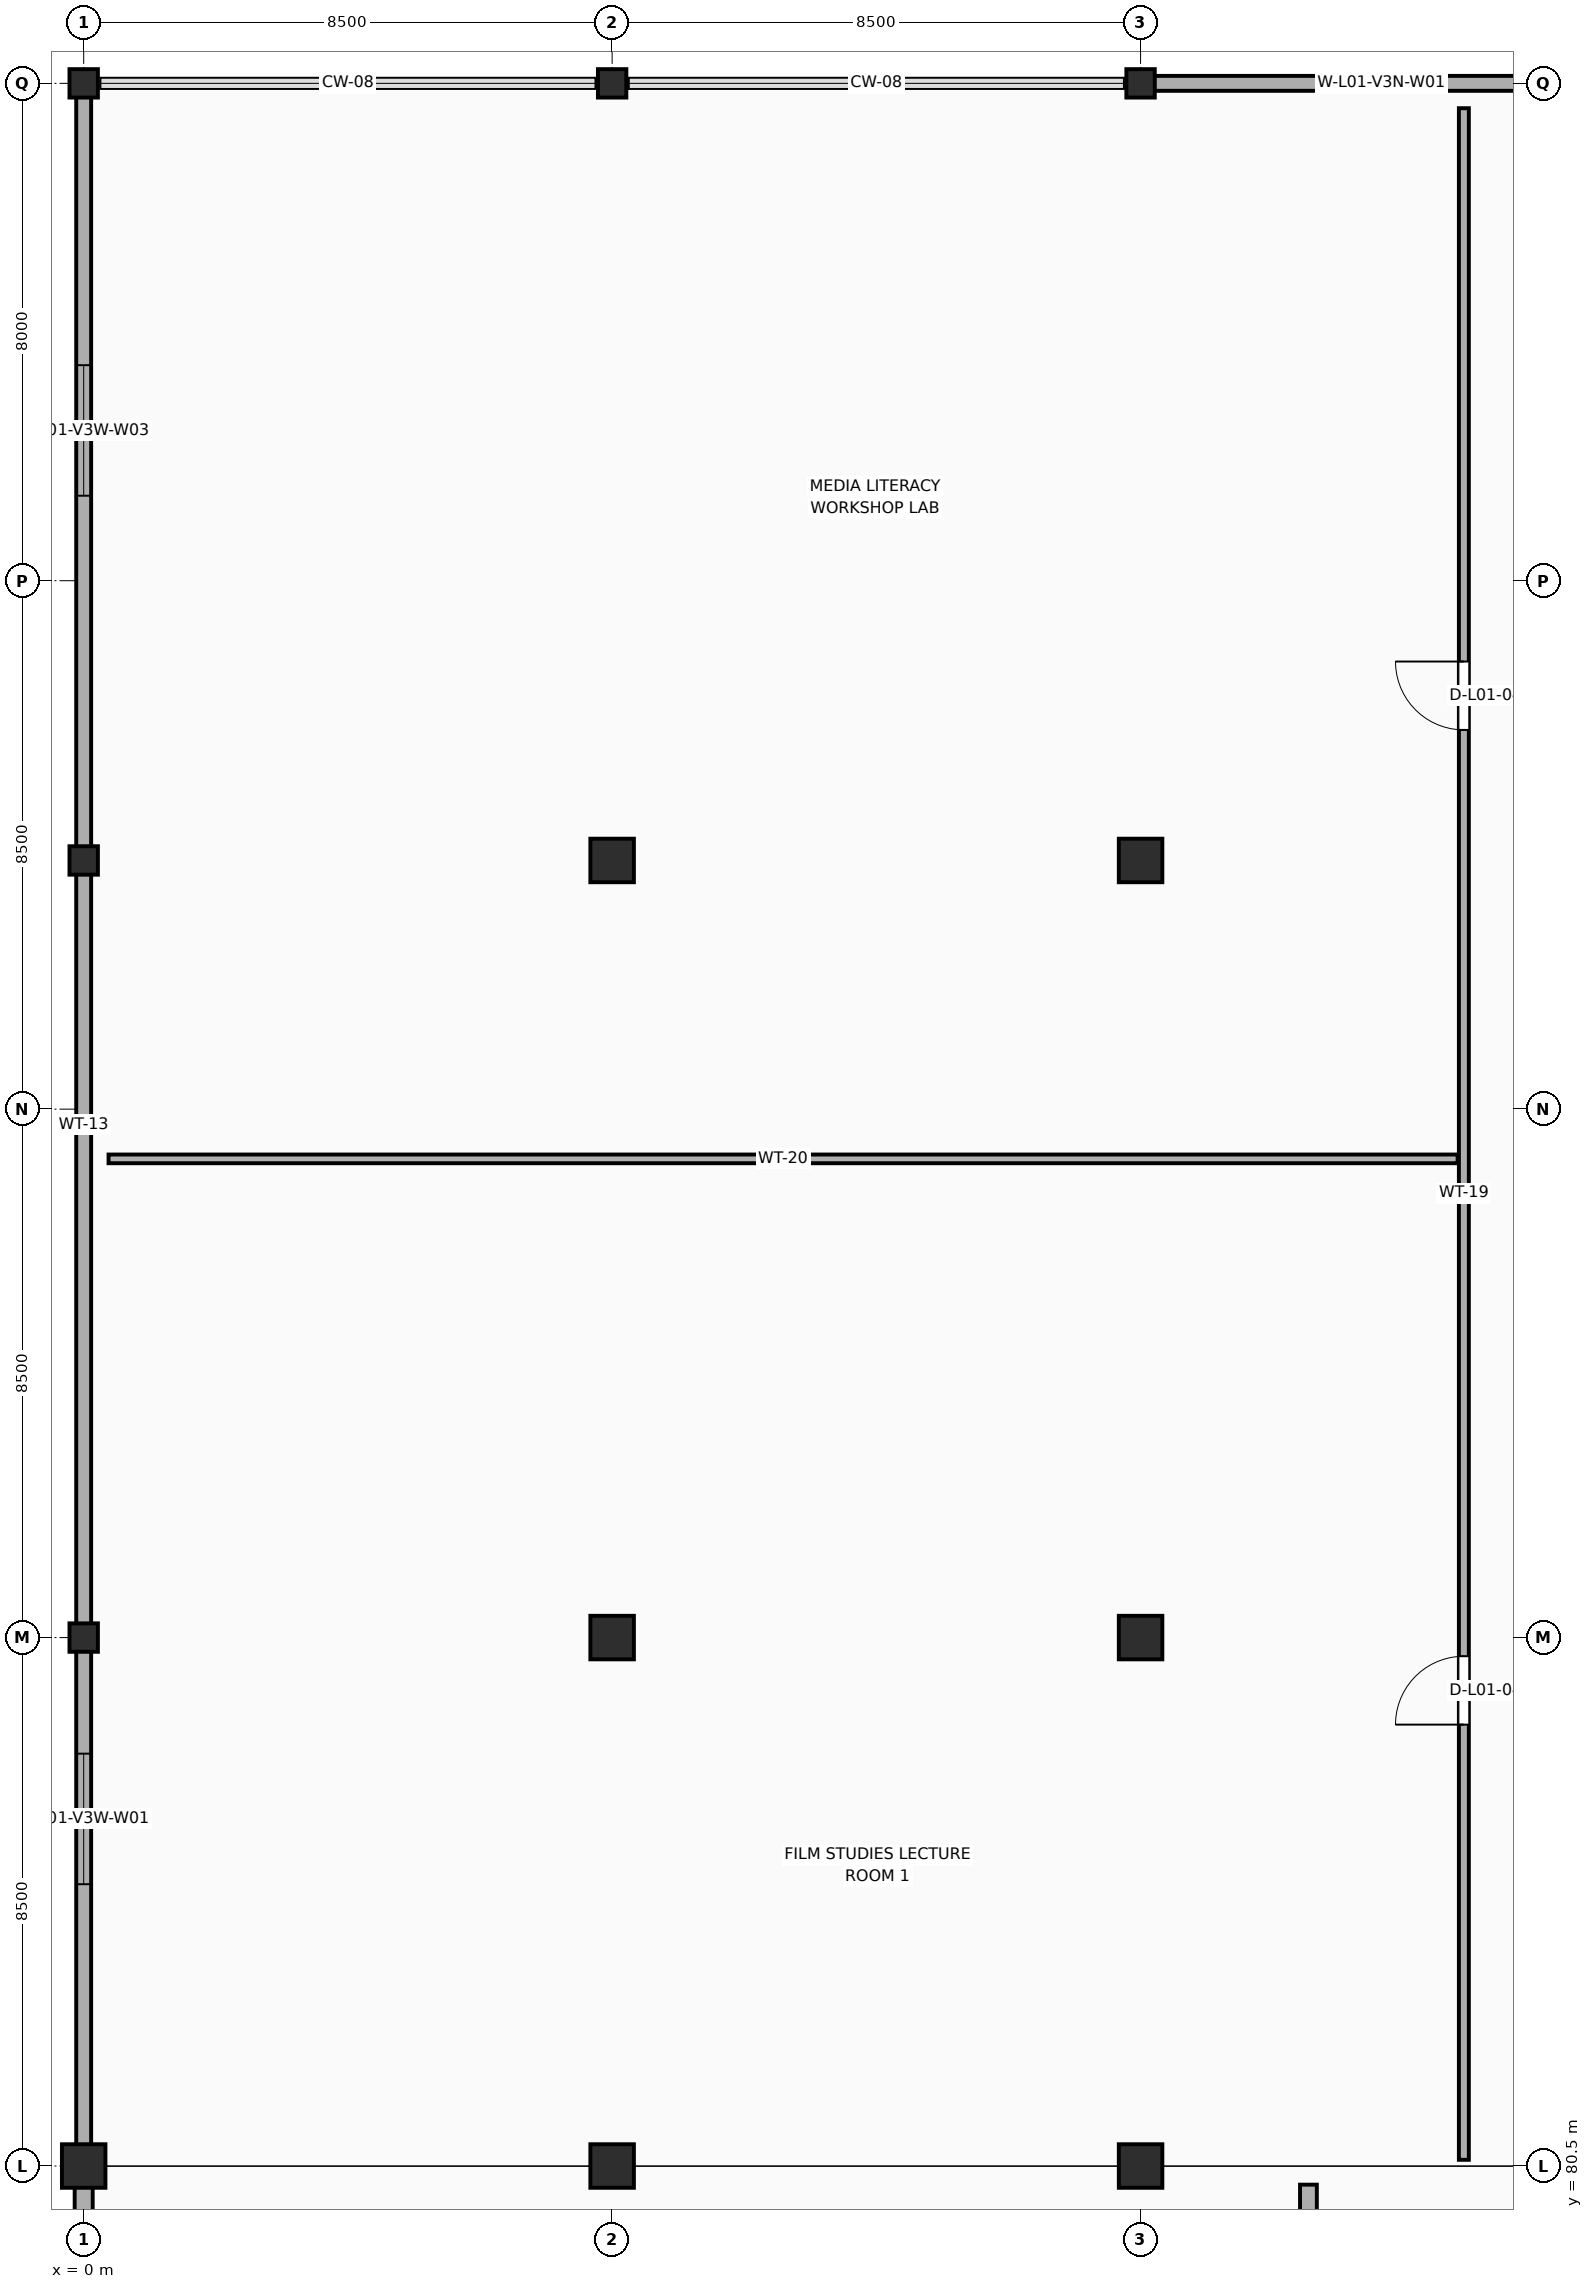
"""IFC4 building model, lengths in metres.
Left out: names, types, materials, properties, quantities, classifications, styles, units other than length and angle.
Written with IfcOpenShell. Run it as: python <this file> out.ifc"""

import sys

from ifc_helpers import new_model, si_unit, direction, frame, frame_2d, origin, origin_2d, place, context, subcontext, project, spatial, rectangle, hollow_circle, extrude, element, fill, save


model = new_model("IFC4")
c1 = context("Model", 3, precision=1e-05, world=origin(), true_north=direction((0.0, 1.0)))
c2 = subcontext(c1, "Body", "Model", "MODEL_VIEW")
j1 = project(units=[si_unit("LENGTHUNIT", "METRE"), si_unit("PLANEANGLEUNIT", "RADIAN")], contexts=[c1])
p1 = place(None, origin())
s1 = spatial("IfcSite", under=j1, at=p1, CompositionType="ELEMENT")
p2 = place(p1, origin())
s2 = spatial("IfcBuilding", under=s1, at=p2, CompositionType="ELEMENT")
p3 = place(p2, frame((0.0, 0.0, 5.4)))
s3 = spatial("IfcBuildingStorey", under=s2, at=p3, CompositionType="ELEMENT", Elevation=5.4)
p4 = place(p3, frame((0.0, 80.5, 0.0), z_axis=(0.0, 0.0, 1.0), x_axis=(1.0, 0.0, 0.0)))
e1 = element("IfcColumn", 1, at=p4, inside=s3, PredefinedType="COLUMN", context=c2, shape_type="SweptSolid", body=[
    extrude(rectangle(XDim=0.7, YDim=0.7, at=origin_2d()), origin(), (0.0, 0.0, 1.0), 4.53),
])
p5 = place(p3, frame((0.0, 89.0, 0.0), z_axis=(0.0, 0.0, 1.0), x_axis=(1.0, 0.0, 0.0)))
e2 = element("IfcColumn", 2, at=p5, inside=s3, PredefinedType="COLUMN", context=c2, shape_type="SweptSolid", body=[
    extrude(hollow_circle(Radius=0.229, WallThickness=0.016, at=origin_2d()), origin(), (0.0, 0.0, 1.0), 4.53),
])
for number, where, z_axis, x_axis in (
    (3, (0.0, 101.5, 0.0), (0.0, 0.0, 1.0), (1.0, 0.0, 0.0)),
    (4, (0.0, 114.0, 0.0), (0.0, 0.0, 1.0), (1.0, 0.0, 0.0)),
):
    element("IfcColumn", number, at=place(p3, frame(where, z_axis=z_axis, x_axis=x_axis)), inside=s3, PredefinedType="COLUMN", context=c2, shape_type="SweptSolid", body=[
        extrude(hollow_circle(Radius=0.229, WallThickness=0.016, at=origin_2d()), origin(), (0.0, 0.0, 1.0), 4.54),
    ])
for number, where, z_axis, x_axis in (
    (5, (8.5, 80.5, 0.0), (0.0, 0.0, 1.0), (1.0, 0.0, 0.0)),
    (6, (8.5, 89.0, 0.0), (0.0, 0.0, 1.0), (1.0, 0.0, 0.0)),
):
    element("IfcColumn", number, at=place(p3, frame(where, z_axis=z_axis, x_axis=x_axis)), inside=s3, PredefinedType="COLUMN", context=c2, shape_type="SweptSolid", body=[
        extrude(rectangle(XDim=0.7, YDim=0.7, at=origin_2d()), origin(), (0.0, 0.0, 1.0), 4.53),
    ])
p6 = place(p3, frame((8.5, 101.5, 0.0), z_axis=(0.0, 0.0, 1.0), x_axis=(1.0, 0.0, 0.0)))
e7 = element("IfcColumn", 7, at=p6, inside=s3, PredefinedType="COLUMN", context=c2, shape_type="SweptSolid", body=[
    extrude(rectangle(XDim=0.7, YDim=0.7, at=origin_2d()), origin(), (0.0, 0.0, 1.0), 4.54),
])
p7 = place(p3, frame((8.5, 114.0, 0.0), z_axis=(0.0, 0.0, 1.0), x_axis=(1.0, 0.0, 0.0)))
e8 = element("IfcColumn", 8, at=p7, inside=s3, PredefinedType="COLUMN", context=c2, shape_type="SweptSolid", body=[
    extrude(hollow_circle(Radius=0.229, WallThickness=0.016, at=origin_2d()), origin(), (0.0, 0.0, 1.0), 4.54),
])
for number, where, z_axis, x_axis in (
    (9, (17.0, 80.5, 0.0), (0.0, 0.0, 1.0), (1.0, 0.0, 0.0)),
    (10, (17.0, 89.0, 0.0), (0.0, 0.0, 1.0), (1.0, 0.0, 0.0)),
):
    element("IfcColumn", number, at=place(p3, frame(where, z_axis=z_axis, x_axis=x_axis)), inside=s3, PredefinedType="COLUMN", context=c2, shape_type="SweptSolid", body=[
        extrude(rectangle(XDim=0.7, YDim=0.7, at=origin_2d()), origin(), (0.0, 0.0, 1.0), 4.53),
    ])
p8 = place(p3, frame((17.0, 101.5, 0.0), z_axis=(0.0, 0.0, 1.0), x_axis=(1.0, 0.0, 0.0)))
e11 = element("IfcColumn", 11, at=p8, inside=s3, PredefinedType="COLUMN", context=c2, shape_type="SweptSolid", body=[
    extrude(rectangle(XDim=0.7, YDim=0.7, at=origin_2d()), origin(), (0.0, 0.0, 1.0), 4.54),
])
p9 = place(p3, frame((17.0, 114.0, 0.0), z_axis=(0.0, 0.0, 1.0), x_axis=(1.0, 0.0, 0.0)))
e12 = element("IfcColumn", 12, at=p9, inside=s3, PredefinedType="COLUMN", context=c2, shape_type="SweptSolid", body=[
    extrude(hollow_circle(Radius=0.229, WallThickness=0.016, at=origin_2d()), origin(), (0.0, 0.0, 1.0), 4.54),
])
p10 = place(p3, frame((0.0, 32.0, 0.0), z_axis=(0.0, 0.0, 1.0), x_axis=(0.0, 1.0, 0.0)))
e13 = element("IfcWall", 13, at=p10, inside=s3, PredefinedType="STANDARD", context=c2, shape_type="SweptSolid", body=[
    extrude(rectangle(XDim=48.5, YDim=0.29, at=frame_2d((24.25, 0.0))), origin(), (0.0, 0.0, 1.0), 3.68),
])
p11 = place(p10, frame((3.35, 0.0, 2.12)))
e14 = element("IfcOpeningElement", 14, at=p11, cuts=e13, PredefinedType="OPENING", context=c2, shape_type="SweptSolid", body=[
    extrude(rectangle(XDim=3.0, YDim=1.4, at=frame_2d((1.5, 0.7))), frame((0.0, 0.157, 0.0), z_axis=(0.0, -1.0, 0.0), x_axis=(1.0, 0.0, 0.0)), (0.0, 0.0, 1.0), 0.314),
])
p12 = place(p10, frame((32.45, 0.0, 2.12)))
e15 = element("IfcOpeningElement", 15, at=p12, cuts=e13, PredefinedType="OPENING", context=c2, shape_type="SweptSolid", body=[
    extrude(rectangle(XDim=3.0, YDim=1.4, at=frame_2d((1.5, 0.7))), frame((0.0, 0.157, 0.0), z_axis=(0.0, -1.0, 0.0), x_axis=(1.0, 0.0, 0.0)), (0.0, 0.0, 1.0), 0.314),
])
p13 = place(p10, frame((42.15, 0.0, 2.12)))
e16 = element("IfcOpeningElement", 16, at=p13, cuts=e13, PredefinedType="OPENING", context=c2, shape_type="SweptSolid", body=[
    extrude(rectangle(XDim=3.0, YDim=1.4, at=frame_2d((1.5, 0.7))), frame((0.0, 0.157, 0.0), z_axis=(0.0, -1.0, 0.0), x_axis=(1.0, 0.0, 0.0)), (0.0, 0.0, 1.0), 0.314),
])
p14 = place(p3, frame((0.0, 80.5, 0.0), z_axis=(0.0, 0.0, 1.0), x_axis=(0.0, 1.0, 0.0)))
e17 = element("IfcWall", 17, at=p14, inside=s3, PredefinedType="STANDARD", context=c2, shape_type="SweptSolid", body=[
    extrude(rectangle(XDim=33.5, YDim=0.24, at=frame_2d((16.75, 0.0))), origin(), (0.0, 0.0, 1.0), 4.168),
])
p15 = place(p14, frame((4.533, 0.0, 0.9)))
e18 = element("IfcOpeningElement", 18, at=p15, cuts=e17, PredefinedType="OPENING", context=c2, shape_type="SweptSolid", body=[
    extrude(rectangle(XDim=2.1, YDim=1.8, at=frame_2d((1.05, 0.9))), frame((0.0, 0.132, 0.0), z_axis=(0.0, -1.0, 0.0), x_axis=(1.0, 0.0, 0.0)), (0.0, 0.0, 1.0), 0.264),
])
p16 = place(p14, frame((26.867, 0.0, 0.9)))
e19 = element("IfcOpeningElement", 19, at=p16, cuts=e17, PredefinedType="OPENING", context=c2, shape_type="SweptSolid", body=[
    extrude(rectangle(XDim=2.1, YDim=1.8, at=frame_2d((1.05, 0.9))), frame((0.0, 0.132, 0.0), z_axis=(0.0, -1.0, 0.0), x_axis=(1.0, 0.0, 0.0)), (0.0, 0.0, 1.0), 0.264),
])
p17 = place(p3, frame((17.0, 114.0, 0.0), z_axis=(0.0, 0.0, 1.0), x_axis=(1.0, 0.0, 0.0)))
e20 = element("IfcWall", 20, at=p17, inside=s3, PredefinedType="STANDARD", context=c2, shape_type="SweptSolid", body=[
    extrude(rectangle(XDim=17.0, YDim=0.24, at=frame_2d((8.5, 0.0))), origin(), (0.0, 0.0, 1.0), 4.208),
])
p18 = place(p17, frame((2.97, 0.0, 0.9)))
e21 = element("IfcOpeningElement", 21, at=p18, cuts=e20, PredefinedType="OPENING", context=c2, shape_type="SweptSolid", body=[
    extrude(rectangle(XDim=1.8, YDim=1.8, at=frame_2d((0.9, 0.9))), frame((0.0, 0.132, 0.0), z_axis=(0.0, -1.0, 0.0), x_axis=(1.0, 0.0, 0.0)), (0.0, 0.0, 1.0), 0.264),
])
p19 = place(p17, frame((11.85, 0.0, 0.9)))
e22 = element("IfcOpeningElement", 22, at=p19, cuts=e20, PredefinedType="OPENING", context=c2, shape_type="SweptSolid", body=[
    extrude(rectangle(XDim=1.8, YDim=1.8, at=frame_2d((0.9, 0.9))), frame((0.0, 0.132, 0.0), z_axis=(0.0, -1.0, 0.0), x_axis=(1.0, 0.0, 0.0)), (0.0, 0.0, 1.0), 0.264),
])
p20 = place(p3, frame((19.7, 32.2, 0.0), z_axis=(0.0, 0.0, 1.0), x_axis=(0.0, 1.0, 0.0)))
e23 = element("IfcWall", 23, at=p20, inside=s3, PredefinedType="PARTITIONING", context=c2, shape_type="SweptSolid", body=[
    extrude(rectangle(XDim=48.0, YDim=0.27, at=frame_2d((24.0, 0.0))), origin(), (0.0, 0.0, 1.0), 3.728),
])
p21 = place(p20, frame((10.0, 0.0, 0.0)))
e24 = element("IfcOpeningElement", 24, at=p21, cuts=e23, PredefinedType="OPENING", context=c2, shape_type="SweptSolid", body=[
    extrude(rectangle(XDim=1.8, YDim=2.4, at=frame_2d((0.9, 1.2))), frame((0.0, 0.147, 0.0), z_axis=(0.0, -1.0, 0.0), x_axis=(1.0, 0.0, 0.0)), (0.0, 0.0, 1.0), 0.294),
])
p22 = place(p20, frame((34.0, 0.0, 0.0)))
e25 = element("IfcOpeningElement", 25, at=p22, cuts=e23, PredefinedType="OPENING", context=c2, shape_type="SweptSolid", body=[
    extrude(rectangle(XDim=1.8, YDim=2.4, at=frame_2d((0.9, 1.2))), frame((0.0, 0.147, 0.0), z_axis=(0.0, -1.0, 0.0), x_axis=(1.0, 0.0, 0.0)), (0.0, 0.0, 1.0), 0.294),
])
p23 = place(p3, frame((22.2, 80.6, 0.0), z_axis=(0.0, 0.0, 1.0), x_axis=(0.0, 1.0, 0.0)))
e26 = element("IfcWall", 26, at=p23, inside=s3, PredefinedType="PARTITIONING", context=c2, shape_type="SweptSolid", body=[
    extrude(rectangle(XDim=33.0, YDim=0.16, at=frame_2d((16.5, 0.0))), origin(), (0.0, 0.0, 1.0), 4.028),
])
p24 = place(p23, frame((7.0, 0.0, 0.0)))
e27 = element("IfcOpeningElement", 27, at=p24, cuts=e26, PredefinedType="OPENING", context=c2, shape_type="SweptSolid", body=[
    extrude(rectangle(XDim=1.1, YDim=2.15, at=frame_2d((0.55, 1.075))), frame((0.0, 0.092, 0.0), z_axis=(0.0, -1.0, 0.0), x_axis=(1.0, 0.0, 0.0)), (0.0, 0.0, 1.0), 0.184),
])
p25 = place(p23, frame((23.0, 0.0, 0.0)))
e28 = element("IfcOpeningElement", 28, at=p25, cuts=e26, PredefinedType="OPENING", context=c2, shape_type="SweptSolid", body=[
    extrude(rectangle(XDim=1.1, YDim=2.15, at=frame_2d((0.55, 1.075))), frame((0.0, 0.092, 0.0), z_axis=(0.0, -1.0, 0.0), x_axis=(1.0, 0.0, 0.0)), (0.0, 0.0, 1.0), 0.184),
])
p26 = place(p3, frame((0.4, 96.7, 0.0), z_axis=(0.0, 0.0, 1.0), x_axis=(1.0, 0.0, 0.0)))
e29 = element("IfcWall", 29, at=p26, inside=s3, PredefinedType="PARTITIONING", context=c2, shape_type="SweptSolid", body=[
    extrude(rectangle(XDim=21.7, YDim=0.14, at=frame_2d((10.85, 0.0))), origin(), (0.0, 0.0, 1.0), 3.728),
])
p27 = place(p15, origin())
e30 = element("IfcWindow", 30, at=p27, inside=s3, PartitioningType="SINGLE_PANEL", PredefinedType="WINDOW", context=c2, shape_type="SweptSolid", body=[
    extrude(rectangle(XDim=2.1, YDim=1.8, at=frame_2d((1.05, 0.9))), frame((0.0, 0.03, 0.0), z_axis=(0.0, -1.0, 0.0), x_axis=(1.0, 0.0, 0.0)), (0.0, 0.0, 1.0), 0.06),
])
fill(e18, e30)
p28 = place(p16, origin())
e31 = element("IfcWindow", 31, at=p28, inside=s3, PartitioningType="SINGLE_PANEL", PredefinedType="WINDOW", context=c2, shape_type="SweptSolid", body=[
    extrude(rectangle(XDim=2.1, YDim=1.8, at=frame_2d((1.05, 0.9))), frame((0.0, 0.03, 0.0), z_axis=(0.0, -1.0, 0.0), x_axis=(1.0, 0.0, 0.0)), (0.0, 0.0, 1.0), 0.06),
])
fill(e19, e31)
p29 = place(p18, origin())
e32 = element("IfcWindow", 32, at=p29, inside=s3, PartitioningType="SINGLE_PANEL", PredefinedType="WINDOW", context=c2, shape_type="SweptSolid", body=[
    extrude(rectangle(XDim=1.8, YDim=1.8, at=frame_2d((0.9, 0.9))), frame((0.0, 0.03, 0.0), z_axis=(0.0, -1.0, 0.0), x_axis=(1.0, 0.0, 0.0)), (0.0, 0.0, 1.0), 0.06),
])
fill(e21, e32)
p30 = place(p24, origin())
e33 = element("IfcDoor", 33, at=p30, inside=s3, OperationType="SINGLE_SWING_LEFT", PredefinedType="DOOR", context=c2, shape_type="SweptSolid", body=[
    extrude(rectangle(XDim=1.1, YDim=2.15, at=frame_2d((0.55, 1.075))), frame((0.0, 0.025, 0.0), z_axis=(0.0, -1.0, 0.0), x_axis=(1.0, 0.0, 0.0)), (0.0, 0.0, 1.0), 0.05),
])
fill(e27, e33)
p31 = place(p25, origin())
e34 = element("IfcDoor", 34, at=p31, inside=s3, OperationType="SINGLE_SWING_RIGHT", PredefinedType="DOOR", context=c2, shape_type="SweptSolid", body=[
    extrude(rectangle(XDim=1.1, YDim=2.15, at=frame_2d((0.55, 1.075))), frame((0.0, 0.025, 0.0), z_axis=(0.0, -1.0, 0.0), x_axis=(1.0, 0.0, 0.0)), (0.0, 0.0, 1.0), 0.05),
])
fill(e28, e34)
save(model, sys.argv[1])
